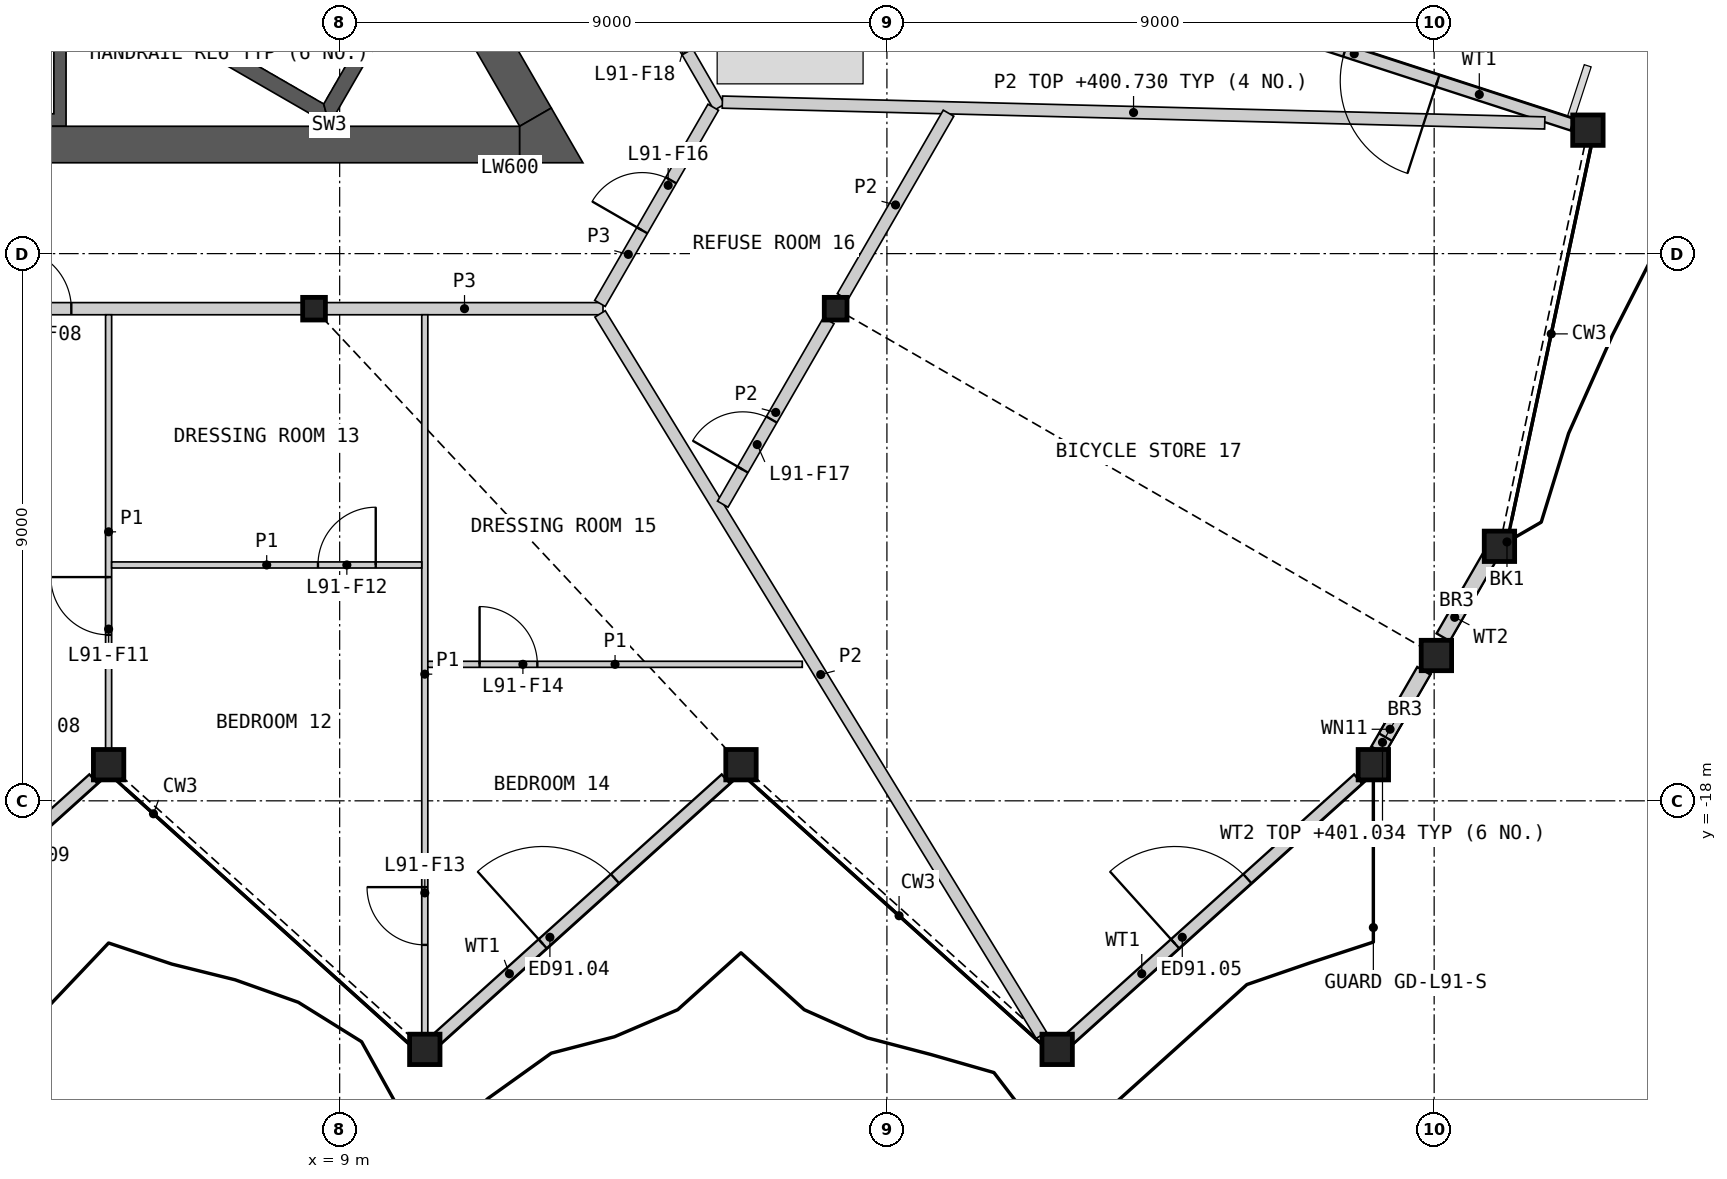
"""IFC4 building model, lengths in metres.
Left out: names, types, materials, properties, quantities, classifications, styles, units other than length and angle.
Written with IfcOpenShell. Run it as: python <this file> out.ifc"""

import sys

from ifc_helpers import new_model, si_unit, direction, frame, frame_2d, origin, origin_2d, place, context, subcontext, project, spatial, polyline, rectangle, hollow_rectangle, i_section, outline, extrude, element, fill, save


model = new_model("IFC4")
c1 = context("Model", 3, precision=1e-05, world=origin(), true_north=direction((0.0, 1.0)))
c2 = subcontext(c1, "Body", "Model", "MODEL_VIEW")
j1 = project(units=[si_unit("LENGTHUNIT", "METRE"), si_unit("PLANEANGLEUNIT", "RADIAN")], contexts=[c1])
p1 = place(None, origin())
s1 = spatial("IfcSite", under=j1, at=p1, CompositionType="ELEMENT")
p2 = place(p1, origin())
s2 = spatial("IfcBuilding", under=s1, at=p2, CompositionType="ELEMENT")
p3 = place(p2, frame((0.0, 0.0, 398.4)))
s3 = spatial("IfcBuildingStorey", under=s2, at=p3, CompositionType="ELEMENT", Elevation=398.4)
for number, where, z_axis, x_axis in (
    (1, (5.2, -17.406, 0.0), (0.0, 0.0, 1.0), (1.0, 0.0, 0.0)),
    (2, (10.4, -22.088, 0.0), (0.0, 0.0, 1.0), (1.0, 0.0, 0.0)),
    (3, (15.6, -17.406, 0.0), (0.0, 0.0, 1.0), (1.0, 0.0, 0.0)),
    (4, (20.8, -22.088, 0.0), (0.0, 0.0, 1.0), (1.0, 0.0, 0.0)),
    (5, (26.0, -17.406, 0.0), (0.0, 0.0, 1.0), (1.0, 0.0, 0.0)),
    (6, (27.037, -15.61, 0.0), (0.0, 0.0, 1.0), (1.0, 0.0, 0.0)),
    (7, (28.074, -13.814, 0.0), (0.0, 0.0, 1.0), (1.0, 0.0, 0.0)),
    (8, (29.529, -6.969, 0.0), (0.0, 0.0, 1.0), (1.0, 0.0, 0.0)),
):
    element("IfcColumn", number, at=place(p3, frame(where, z_axis=z_axis, x_axis=x_axis)), inside=s3, PredefinedType="COLUMN", context=c2, shape_type="SweptSolid", body=[
        extrude(hollow_rectangle(XDim=0.5, YDim=0.5, WallThickness=0.03, at=origin_2d()), origin(), (0.0, 0.0, 1.0), 3.4),
    ])
for number, where, z_axis, x_axis in (
    (9, (8.578, -9.906, 0.0), (0.0, 0.0, 1.0), (1.0, 0.0, 0.0)),
    (10, (17.157, -9.906, 0.0), (0.0, 0.0, 1.0), (1.0, 0.0, 0.0)),
):
    element("IfcColumn", number, at=place(p3, frame(where, z_axis=z_axis, x_axis=x_axis)), inside=s3, PredefinedType="COLUMN", context=c2, shape_type="SweptSolid", body=[
        extrude(i_section(OverallWidth=0.374, OverallDepth=0.372, WebThickness=0.016, FlangeThickness=0.026, at=origin_2d()), origin(), (0.0, 0.0, 1.0), 3.4),
    ])
p4 = place(p3, frame((0.205, -21.912, 0.0), z_axis=(0.0, 0.0, 1.0), x_axis=(0.743132515916, 0.669144277259, 0.0)))
e11 = element("IfcWall", 11, at=p4, inside=s3, PredefinedType="SOLIDWALL", context=c2, shape_type="SweptSolid", body=[
    extrude(rectangle(XDim=6.385, YDim=0.2, at=frame_2d((3.192, 0.0))), origin(), (0.0, 0.0, 1.0), 2.634),
])
p5 = place(p4, frame((2.333, 0.0, 0.0)))
e12 = element("IfcOpeningElement", 12, at=p5, cuts=e11, PredefinedType="OPENING", context=c2, shape_type="SweptSolid", body=[
    extrude(rectangle(XDim=1.6, YDim=2.25, at=frame_2d((0.8, 1.125))), frame((0.0, 0.11, 0.0), z_axis=(0.0, -1.0, 0.0), x_axis=(1.0, 0.0, 0.0)), (0.0, 0.0, 1.0), 0.22),
])
p6 = place(p3, frame((10.605, -21.912, 0.0), z_axis=(0.0, 0.0, 1.0), x_axis=(0.743149635876, 0.669125263831, 0.0)))
e13 = element("IfcWall", 13, at=p6, inside=s3, PredefinedType="SOLIDWALL", context=c2, shape_type="SweptSolid", body=[
    extrude(rectangle(XDim=6.385, YDim=0.2, at=frame_2d((3.193, 0.0))), origin(), (0.0, 0.0, 1.0), 2.634),
])
p7 = place(p6, frame((2.333, 0.0, 0.0)))
e14 = element("IfcOpeningElement", 14, at=p7, cuts=e13, PredefinedType="OPENING", context=c2, shape_type="SweptSolid", body=[
    extrude(rectangle(XDim=1.6, YDim=2.25, at=frame_2d((0.8, 1.125))), frame((0.0, 0.11, 0.0), z_axis=(0.0, -1.0, 0.0), x_axis=(1.0, 0.0, 0.0)), (0.0, 0.0, 1.0), 0.22),
])
p8 = place(p3, frame((21.005, -21.912, 0.0), z_axis=(0.0, 0.0, 1.0), x_axis=(0.743132515916, 0.669144277259, 0.0)))
e15 = element("IfcWall", 15, at=p8, inside=s3, PredefinedType="SOLIDWALL", context=c2, shape_type="SweptSolid", body=[
    extrude(rectangle(XDim=6.385, YDim=0.2, at=frame_2d((3.192, 0.0))), origin(), (0.0, 0.0, 1.0), 2.634),
])
p9 = place(p8, frame((2.333, 0.0, 0.0)))
e16 = element("IfcOpeningElement", 16, at=p9, cuts=e15, PredefinedType="OPENING", context=c2, shape_type="SweptSolid", body=[
    extrude(rectangle(XDim=1.6, YDim=2.25, at=frame_2d((0.8, 1.125))), frame((0.0, 0.11, 0.0), z_axis=(0.0, -1.0, 0.0), x_axis=(1.0, 0.0, 0.0)), (0.0, 0.0, 1.0), 0.22),
])
p10 = place(p3, frame((26.075, -17.169, 0.0), z_axis=(0.0, 0.0, 1.0), x_axis=(0.500048779063, 0.865997239347, 0.0)))
e17 = element("IfcWall", 17, at=p10, inside=s3, PredefinedType="SOLIDWALL", context=c2, shape_type="SweptSolid", body=[
    extrude(rectangle(XDim=1.511, YDim=0.25, at=frame_2d((0.755, 0.0))), origin(), (0.0, 0.0, 1.0), 2.634),
])
p11 = place(p10, frame((0.25, 0.0, 1.7)))
e18 = element("IfcOpeningElement", 18, at=p11, cuts=e17, PredefinedType="OPENING", context=c2, shape_type="SweptSolid", body=[
    extrude(rectangle(XDim=0.6, YDim=0.7, at=frame_2d((0.3, 0.35))), frame((0.0, 0.135, 0.0), z_axis=(0.0, -1.0, 0.0), x_axis=(1.0, 0.0, 0.0)), (0.0, 0.0, 1.0), 0.27),
])
p12 = place(p3, frame((27.148, -15.31, 0.0), z_axis=(0.0, 0.0, 1.0), x_axis=(0.499931517724, 0.866064938435, 0.0)))
e19 = element("IfcWall", 19, at=p12, inside=s3, PredefinedType="SOLIDWALL", context=c2, shape_type="SweptSolid", body=[
    extrude(rectangle(XDim=1.516, YDim=0.25, at=frame_2d((0.758, 0.0))), origin(), (0.0, 0.0, 1.0), 2.634),
])
p13 = place(p3, frame((29.274, -6.88, 0.0), z_axis=(0.0, 0.0, 1.0), x_axis=(-0.951055516513, 0.309020071371, 0.0)))
e20 = element("IfcWall", 20, at=p13, inside=s3, PredefinedType="SOLIDWALL", context=c2, shape_type="SweptSolid", body=[
    extrude(rectangle(XDim=6.44, YDim=0.2, at=frame_2d((3.22, 0.0))), origin(), (0.0, 0.0, 1.0), 2.634),
])
p14 = place(p13, frame((2.333, 0.0, 0.0)))
e21 = element("IfcOpeningElement", 21, at=p14, cuts=e20, PredefinedType="OPENING", context=c2, shape_type="SweptSolid", body=[
    extrude(rectangle(XDim=1.6, YDim=2.25, at=frame_2d((0.8, 1.125))), frame((0.0, 0.11, 0.0), z_axis=(0.0, -1.0, 0.0), x_axis=(1.0, 0.0, 0.0)), (0.0, 0.0, 1.0), 0.22),
])
p15 = place(p3, origin())
e22 = element("IfcWall", 22, at=p15, inside=s3, PredefinedType="SHEAR", context=c2, shape_type="SweptSolid", body=[
    extrude(outline(polyline([(4.5, -4.4), (4.5, -6.906), (-4.5, -6.906), (-4.5, -4.4), (-4.3, -4.4), (-4.3, -6.7), (-2.3, -6.7), (-2.3, -4.4), (-2.1, -4.4), (-2.1, -6.7), (-0.1, -6.7), (-0.1, -4.4), (0.1, -4.4), (0.1, -6.7), (2.1, -6.7), (2.1, -4.4), (2.3, -4.4), (2.3, -6.7), (4.3, -6.7), (4.3, -4.4), (4.5, -4.4)])), origin(), (0.0, 0.0, 1.0), 3.1),
])
p16 = place(p3, origin())
e23 = element("IfcWall", 23, at=p16, inside=s3, PredefinedType="SHEAR", context=c2, shape_type="SweptSolid", body=[
    extrude(outline(polyline([(3.763, -3.956), (8.83, -6.881), (8.738, -6.539), (3.888, -3.739), (3.763, -3.956)])), origin(), (0.0, 0.0, 1.0), 3.1),
])
p17 = place(p3, origin())
e24 = element("IfcWall", 24, at=p17, inside=s3, PredefinedType="SHEAR", context=c2, shape_type="SweptSolid", body=[
    extrude(outline(polyline([(8.83, -6.881), (10.374, -4.206), (10.032, -4.298), (8.738, -6.539), (8.83, -6.881)])), origin(), (0.0, 0.0, 1.0), 3.1),
])
p18 = place(p3, frame((-4.892, -7.206, 0.0), z_axis=(0.0, 0.0, 1.0), x_axis=(1.0, 0.0, 0.0)))
e25 = element("IfcWall", 25, at=p18, inside=s3, PredefinedType="SHEAR", context=c2, shape_type="SweptSolid", body=[
    extrude(rectangle(XDim=16.853, YDim=0.6, at=frame_2d((8.426, 0.0))), origin(), (0.0, 0.0, 1.0), 3.1),
])
p19 = place(p3, frame((12.221, -6.756, 0.0), z_axis=(0.0, 0.0, 1.0), x_axis=(-0.50000604952, 0.866021911064, 0.0)))
e26 = element("IfcWall", 26, at=p19, inside=s3, PredefinedType="SHEAR", context=c2, shape_type="SweptSolid", body=[
    extrude(rectangle(XDim=4.869, YDim=0.6, at=frame_2d((2.434, 0.0))), origin(), (0.0, 0.0, 1.0), 3.1),
])
p20 = place(p3, origin())
e27 = element("IfcWall", 27, at=p20, inside=s3, PredefinedType="SHEAR", context=c2, shape_type="SweptSolid", body=[
    extrude(outline(polyline([(11.961, -7.506), (11.961, -6.906), (12.48, -6.606), (13.0, -7.506), (11.961, -7.506)])), origin(), (0.0, 0.0, 1.0), 3.1),
])
p21 = place(p3, frame((0.197, -9.906, 0.0), z_axis=(0.0, 0.0, 1.0), x_axis=(1.0, 0.0, 0.0)))
e28 = element("IfcWall", 28, at=p21, inside=s3, PredefinedType="PARTITIONING", context=c2, shape_type="SweptSolid", body=[
    extrude(rectangle(XDim=8.185, YDim=0.2, at=frame_2d((4.092, 0.0))), origin(), (0.0, 0.0, 1.0), 3.1),
])
p22 = place(p21, frame((3.39, 0.0, 0.0)))
e29 = element("IfcOpeningElement", 29, at=p22, cuts=e28, PredefinedType="OPENING", context=c2, shape_type="SweptSolid", body=[
    extrude(rectangle(XDim=1.0, YDim=2.1, at=frame_2d((0.5, 1.05))), frame((0.0, 0.11, 0.0), z_axis=(0.0, -1.0, 0.0), x_axis=(1.0, 0.0, 0.0)), (0.0, 0.0, 1.0), 0.22),
])
p23 = place(p3, frame((8.775, -9.906, 0.0), z_axis=(0.0, 0.0, 1.0), x_axis=(1.0, 0.0, 0.0)))
e30 = element("IfcWall", 30, at=p23, inside=s3, PredefinedType="PARTITIONING", context=c2, shape_type="SweptSolid", body=[
    extrude(rectangle(XDim=4.555, YDim=0.2, at=frame_2d((2.278, 0.0))), origin(), (0.0, 0.0, 1.0), 3.1),
])
p24 = place(p3, frame((12.981, -2.673, 0.0), z_axis=(0.0, 0.0, 1.0), x_axis=(0.499974648164, -0.866040040179, 0.0)))
e31 = element("IfcWall", 31, at=p24, inside=s3, PredefinedType="PARTITIONING", context=c2, shape_type="SweptSolid", body=[
    extrude(rectangle(XDim=4.525, YDim=0.2, at=frame_2d((2.263, 0.0))), origin(), (0.0, 0.0, 1.0), 3.1),
])
p25 = place(p24, frame((2.468, 0.0, 0.0)))
e32 = element("IfcOpeningElement", 32, at=p25, cuts=e31, PredefinedType="OPENING", context=c2, shape_type="SweptSolid", body=[
    extrude(rectangle(XDim=1.0, YDim=2.1, at=frame_2d((0.5, 1.05))), frame((0.0, 0.11, 0.0), z_axis=(0.0, -1.0, 0.0), x_axis=(1.0, 0.0, 0.0)), (0.0, 0.0, 1.0), 0.22),
])
p26 = place(p3, frame((13.281, -9.819, 0.0), z_axis=(0.0, 0.0, 1.0), x_axis=(0.499958791762, 0.866049194065, 0.0)))
e33 = element("IfcWall", 33, at=p26, inside=s3, PredefinedType="PARTITIONING", context=c2, shape_type="SweptSolid", body=[
    extrude(rectangle(XDim=3.726, YDim=0.2, at=frame_2d((1.863, 0.0))), origin(), (0.0, 0.0, 1.0), 3.1),
])
p27 = place(p26, frame((1.388, 0.0, 0.0)))
e34 = element("IfcOpeningElement", 34, at=p27, cuts=e33, PredefinedType="OPENING", context=c2, shape_type="SweptSolid", body=[
    extrude(rectangle(XDim=0.95, YDim=2.1, at=frame_2d((0.475, 1.05))), frame((0.0, 0.11, 0.0), z_axis=(0.0, -1.0, 0.0), x_axis=(1.0, 0.0, 0.0)), (0.0, 0.0, 1.0), 0.22),
])
p28 = place(p3, frame((15.294, -6.508, 0.0), z_axis=(0.0, 0.0, 1.0), x_axis=(0.999679467074, -0.02531724927, 0.0)))
e35 = element("IfcWall", 35, at=p28, inside=s3, PredefinedType="PARTITIONING", context=c2, shape_type="SweptSolid", body=[
    extrude(rectangle(XDim=13.53, YDim=0.2, at=frame_2d((6.765, 0.0))), origin(), (0.0, 0.0, 1.0), 2.33),
])
p29 = place(p3, frame((13.283, -9.991, 0.0), z_axis=(0.0, 0.0, 1.0), x_axis=(0.521777294246, -0.853081740052, 0.0)))
e36 = element("IfcWall", 36, at=p29, inside=s3, PredefinedType="PARTITIONING", context=c2, shape_type="SweptSolid", body=[
    extrude(rectangle(XDim=13.908, YDim=0.2, at=frame_2d((6.954, 0.0))), origin(), (0.0, 0.0, 1.0), 2.33),
])
p30 = place(p3, frame((15.301, -13.121, 0.0), z_axis=(0.0, 0.0, 1.0), x_axis=(0.499981154543, 0.866036283941, 0.0)))
e37 = element("IfcWall", 37, at=p30, inside=s3, PredefinedType="PARTITIONING", context=c2, shape_type="SweptSolid", body=[
    extrude(rectangle(XDim=3.486, YDim=0.2, at=frame_2d((1.743, 0.0))), origin(), (0.0, 0.0, 1.0), 2.33),
])
p31 = place(p30, frame((0.657, 0.0, 0.0)))
e38 = element("IfcOpeningElement", 38, at=p31, cuts=e37, PredefinedType="OPENING", context=c2, shape_type="SweptSolid", body=[
    extrude(rectangle(XDim=0.95, YDim=2.1, at=frame_2d((0.475, 1.05))), frame((0.0, 0.11, 0.0), z_axis=(0.0, -1.0, 0.0), x_axis=(1.0, 0.0, 0.0)), (0.0, 0.0, 1.0), 0.22),
])
p32 = place(p3, frame((17.271, -9.708, 0.0), z_axis=(0.0, 0.0, 1.0), x_axis=(0.500011485685, 0.866018772419, 0.0)))
e39 = element("IfcWall", 39, at=p32, inside=s3, PredefinedType="PARTITIONING", context=c2, shape_type="SweptSolid", body=[
    extrude(rectangle(XDim=3.485, YDim=0.2, at=frame_2d((1.743, 0.0))), origin(), (0.0, 0.0, 1.0), 2.33),
])
p33 = place(p3, frame((10.4, -21.828, 0.0), z_axis=(0.0, 0.0, 1.0), x_axis=(0.0, 1.0, 0.0)))
e40 = element("IfcWall", 40, at=p33, inside=s3, PredefinedType="PARTITIONING", context=c2, shape_type="SweptSolid", body=[
    extrude(rectangle(XDim=11.822, YDim=0.1, at=frame_2d((5.911, 0.0))), origin(), (0.0, 0.0, 1.0), 2.33),
])
p34 = place(p33, frame((1.458, 0.0, 0.0)))
e41 = element("IfcOpeningElement", 41, at=p34, cuts=e40, PredefinedType="OPENING", context=c2, shape_type="SweptSolid", body=[
    extrude(rectangle(XDim=0.95, YDim=2.1, at=frame_2d((0.475, 1.05))), frame((0.0, 0.06, 0.0), z_axis=(0.0, -1.0, 0.0), x_axis=(1.0, 0.0, 0.0)), (0.0, 0.0, 1.0), 0.12),
])
p35 = place(p3, frame((5.2, -17.146, 0.0), z_axis=(0.0, 0.0, 1.0), x_axis=(0.0, 1.0, 0.0)))
e42 = element("IfcWall", 42, at=p35, inside=s3, PredefinedType="PARTITIONING", context=c2, shape_type="SweptSolid", body=[
    extrude(rectangle(XDim=7.14, YDim=0.1, at=frame_2d((3.57, 0.0))), origin(), (0.0, 0.0, 1.0), 2.33),
])
p36 = place(p35, frame((1.876, 0.0, 0.0)))
e43 = element("IfcOpeningElement", 43, at=p36, cuts=e42, PredefinedType="OPENING", context=c2, shape_type="SweptSolid", body=[
    extrude(rectangle(XDim=0.95, YDim=2.1, at=frame_2d((0.475, 1.05))), frame((0.0, 0.06, 0.0), z_axis=(0.0, -1.0, 0.0), x_axis=(1.0, 0.0, 0.0)), (0.0, 0.0, 1.0), 0.12),
])
p37 = place(p3, frame((10.45, -15.755, 0.0), z_axis=(0.0, 0.0, 1.0), x_axis=(1.0, 0.0, 0.0)))
e44 = element("IfcWall", 44, at=p37, inside=s3, PredefinedType="PARTITIONING", context=c2, shape_type="SweptSolid", body=[
    extrude(rectangle(XDim=6.158, YDim=0.1, at=frame_2d((3.079, 0.0))), origin(), (0.0, 0.0, 1.0), 2.33),
])
p38 = place(p37, frame((0.851, 0.0, 0.0)))
e45 = element("IfcOpeningElement", 45, at=p38, cuts=e44, PredefinedType="OPENING", context=c2, shape_type="SweptSolid", body=[
    extrude(rectangle(XDim=0.95, YDim=2.1, at=frame_2d((0.475, 1.05))), frame((0.0, 0.06, 0.0), z_axis=(0.0, -1.0, 0.0), x_axis=(1.0, 0.0, 0.0)), (0.0, 0.0, 1.0), 0.12),
])
p39 = place(p3, frame((5.25, -14.121, 0.0), z_axis=(0.0, 0.0, 1.0), x_axis=(1.0, 0.0, 0.0)))
e46 = element("IfcWall", 46, at=p39, inside=s3, PredefinedType="PARTITIONING", context=c2, shape_type="SweptSolid", body=[
    extrude(rectangle(XDim=5.1, YDim=0.1, at=frame_2d((2.55, 0.0))), origin(), (0.0, 0.0, 1.0), 2.33),
])
p40 = place(p39, frame((3.393, 0.0, 0.0)))
e47 = element("IfcOpeningElement", 47, at=p40, cuts=e46, PredefinedType="OPENING", context=c2, shape_type="SweptSolid", body=[
    extrude(rectangle(XDim=0.95, YDim=2.1, at=frame_2d((0.475, 1.05))), frame((0.0, 0.06, 0.0), z_axis=(0.0, -1.0, 0.0), x_axis=(1.0, 0.0, 0.0)), (0.0, 0.0, 1.0), 0.12),
])
p41 = place(p7, origin())
e48 = element("IfcDoor", 48, at=p41, inside=s3, OperationType="DOUBLE_DOOR_SINGLE_SWING", PredefinedType="DOOR", context=c2, shape_type="SweptSolid", body=[
    extrude(rectangle(XDim=1.6, YDim=2.25, at=frame_2d((0.8, 1.125))), frame((0.0, 0.025, 0.0), z_axis=(0.0, -1.0, 0.0), x_axis=(1.0, 0.0, 0.0)), (0.0, 0.0, 1.0), 0.05),
])
fill(e14, e48)
p42 = place(p9, origin())
e49 = element("IfcDoor", 49, at=p42, inside=s3, OperationType="DOUBLE_DOOR_SINGLE_SWING", PredefinedType="DOOR", context=c2, shape_type="SweptSolid", body=[
    extrude(rectangle(XDim=1.6, YDim=2.25, at=frame_2d((0.8, 1.125))), frame((0.0, 0.025, 0.0), z_axis=(0.0, -1.0, 0.0), x_axis=(1.0, 0.0, 0.0)), (0.0, 0.0, 1.0), 0.05),
])
fill(e16, e49)
p43 = place(p11, origin())
e50 = element("IfcWindow", 50, at=p43, inside=s3, PartitioningType="SINGLE_PANEL", PredefinedType="WINDOW", context=c2, shape_type="SweptSolid", body=[
    extrude(rectangle(XDim=0.6, YDim=0.7, at=frame_2d((0.3, 0.35))), frame((0.0, 0.03, 0.0), z_axis=(0.0, -1.0, 0.0), x_axis=(1.0, 0.0, 0.0)), (0.0, 0.0, 1.0), 0.06),
])
fill(e18, e50)
p44 = place(p14, origin())
e51 = element("IfcDoor", 51, at=p44, inside=s3, OperationType="DOUBLE_DOOR_SINGLE_SWING", PredefinedType="DOOR", context=c2, shape_type="SweptSolid", body=[
    extrude(rectangle(XDim=1.6, YDim=2.25, at=frame_2d((0.8, 1.125))), frame((0.0, 0.025, 0.0), z_axis=(0.0, -1.0, 0.0), x_axis=(1.0, 0.0, 0.0)), (0.0, 0.0, 1.0), 0.05),
])
fill(e21, e51)
p45 = place(p22, origin())
e52 = element("IfcDoor", 52, at=p45, inside=s3, OperationType="SINGLE_SWING_LEFT", PredefinedType="DOOR", context=c2, shape_type="SweptSolid", body=[
    extrude(rectangle(XDim=1.0, YDim=2.1, at=frame_2d((0.5, 1.05))), frame((0.0, 0.025, 0.0), z_axis=(0.0, -1.0, 0.0), x_axis=(1.0, 0.0, 0.0)), (0.0, 0.0, 1.0), 0.05),
])
fill(e29, e52)
p46 = place(p36, origin())
e53 = element("IfcDoor", 53, at=p46, inside=s3, OperationType="SINGLE_SWING_RIGHT", PredefinedType="DOOR", context=c2, shape_type="SweptSolid", body=[
    extrude(rectangle(XDim=0.95, YDim=2.1, at=frame_2d((0.475, 1.05))), frame((0.0, 0.025, 0.0), z_axis=(0.0, -1.0, 0.0), x_axis=(1.0, 0.0, 0.0)), (0.0, 0.0, 1.0), 0.05),
])
fill(e43, e53)
p47 = place(p40, origin())
e54 = element("IfcDoor", 54, at=p47, inside=s3, OperationType="SINGLE_SWING_RIGHT", PredefinedType="DOOR", context=c2, shape_type="SweptSolid", body=[
    extrude(rectangle(XDim=0.95, YDim=2.1, at=frame_2d((0.475, 1.05))), frame((0.0, 0.025, 0.0), z_axis=(0.0, -1.0, 0.0), x_axis=(1.0, 0.0, 0.0)), (0.0, 0.0, 1.0), 0.05),
])
fill(e47, e54)
p48 = place(p34, origin())
e55 = element("IfcDoor", 55, at=p48, inside=s3, OperationType="SINGLE_SWING_RIGHT", PredefinedType="DOOR", context=c2, shape_type="SweptSolid", body=[
    extrude(rectangle(XDim=0.95, YDim=2.1, at=frame_2d((0.475, 1.05))), frame((0.0, 0.025, 0.0), z_axis=(0.0, -1.0, 0.0), x_axis=(1.0, 0.0, 0.0)), (0.0, 0.0, 1.0), 0.05),
])
fill(e41, e55)
p49 = place(p38, origin())
e56 = element("IfcDoor", 56, at=p49, inside=s3, OperationType="SINGLE_SWING_LEFT", PredefinedType="DOOR", context=c2, shape_type="SweptSolid", body=[
    extrude(rectangle(XDim=0.95, YDim=2.1, at=frame_2d((0.475, 1.05))), frame((0.0, 0.025, 0.0), z_axis=(0.0, -1.0, 0.0), x_axis=(1.0, 0.0, 0.0)), (0.0, 0.0, 1.0), 0.05),
])
fill(e45, e56)
p50 = place(p27, origin())
e57 = element("IfcDoor", 57, at=p50, inside=s3, OperationType="SINGLE_SWING_LEFT", PredefinedType="DOOR", context=c2, shape_type="SweptSolid", body=[
    extrude(rectangle(XDim=0.95, YDim=2.1, at=frame_2d((0.475, 1.05))), frame((0.0, 0.025, 0.0), z_axis=(0.0, -1.0, 0.0), x_axis=(1.0, 0.0, 0.0)), (0.0, 0.0, 1.0), 0.05),
])
fill(e34, e57)
p51 = place(p31, origin())
e58 = element("IfcDoor", 58, at=p51, inside=s3, OperationType="SINGLE_SWING_LEFT", PredefinedType="DOOR", context=c2, shape_type="SweptSolid", body=[
    extrude(rectangle(XDim=0.95, YDim=2.1, at=frame_2d((0.475, 1.05))), frame((0.0, 0.025, 0.0), z_axis=(0.0, -1.0, 0.0), x_axis=(1.0, 0.0, 0.0)), (0.0, 0.0, 1.0), 0.05),
])
fill(e38, e58)
p52 = place(p25, origin())
e59 = element("IfcDoor", 59, at=p52, inside=s3, OperationType="SINGLE_SWING_LEFT", PredefinedType="DOOR", context=c2, shape_type="SweptSolid", body=[
    extrude(rectangle(XDim=1.0, YDim=2.1, at=frame_2d((0.5, 1.05))), frame((0.0, 0.025, 0.0), z_axis=(0.0, -1.0, 0.0), x_axis=(1.0, 0.0, 0.0)), (0.0, 0.0, 1.0), 0.05),
])
fill(e32, e59)
save(model, sys.argv[1])
